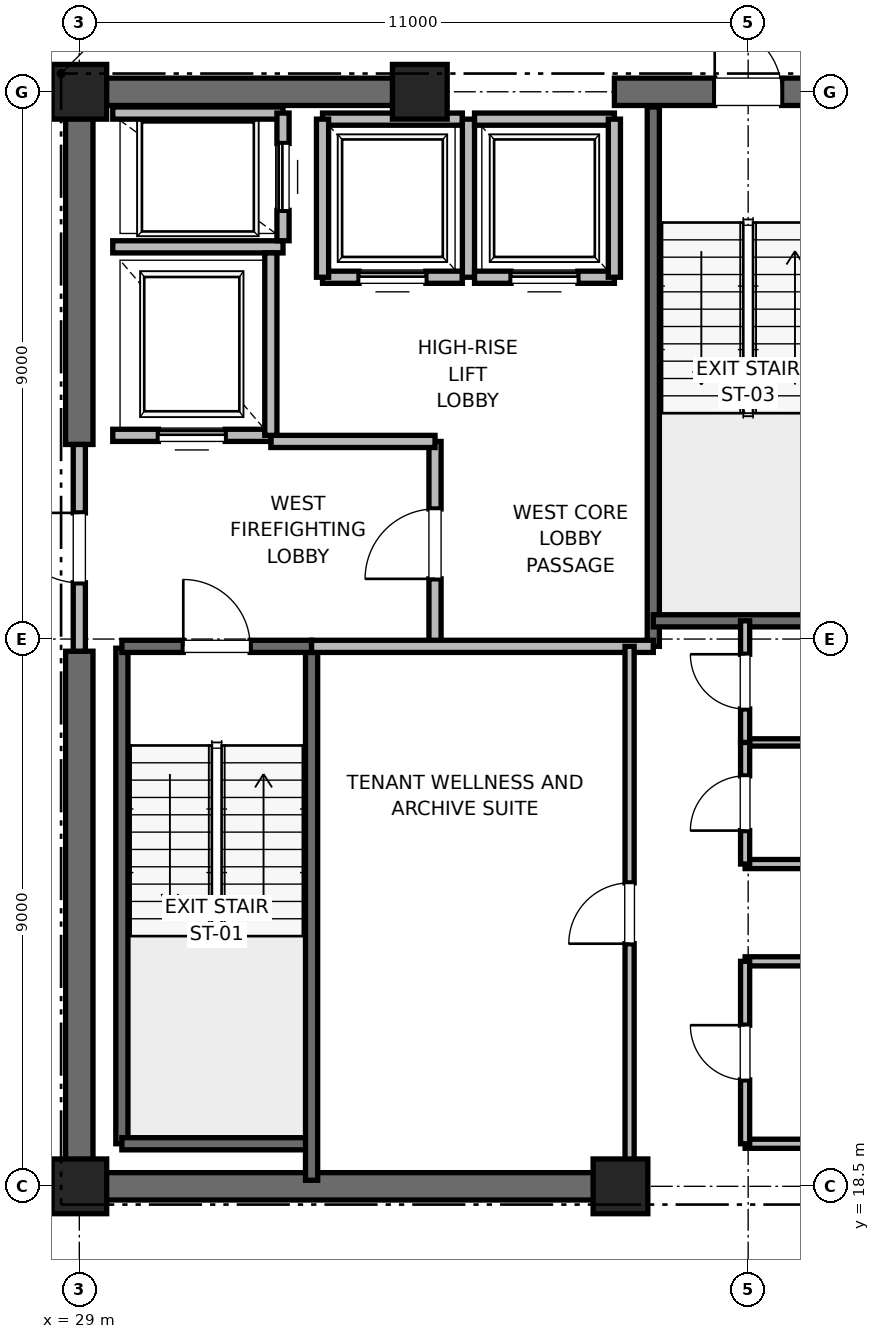
"""IFC4 building model, lengths in metres.
Left out: names, types, materials, properties, quantities, classifications, styles, units other than length and angle.
Written with IfcOpenShell. Run it as: python <this file> out.ifc"""

import sys

from ifc_helpers import new_model, si_unit, direction, frame, frame_2d, origin, origin_2d, place, context, subcontext, project, spatial, rectangle, extrude, element, fill, save


model = new_model("IFC4")
c1 = context("Model", 3, precision=1e-05, world=origin(), true_north=direction((0.0, 1.0)))
c2 = subcontext(c1, "Body", "Model", "MODEL_VIEW")
j1 = project(units=[si_unit("LENGTHUNIT", "METRE"), si_unit("PLANEANGLEUNIT", "RADIAN")], contexts=[c1])
p1 = place(None, origin())
s1 = spatial("IfcSite", under=j1, at=p1, CompositionType="ELEMENT")
p2 = place(p1, origin())
s2 = spatial("IfcBuilding", under=s1, at=p2, CompositionType="ELEMENT")
p3 = place(p2, frame((0.0, 0.0, 287.2)))
s3 = spatial("IfcBuildingStorey", under=s2, at=p3, CompositionType="ELEMENT", Elevation=287.2)
for number, where, z_axis, x_axis in (
    (1, (29.0, 18.5, 0.0), (0.0, 0.0, 1.0), (1.0, 0.0, 0.0)),
    (2, (29.0, 36.5, 0.0), (0.0, 0.0, 1.0), (1.0, 0.0, 0.0)),
    (3, (37.9, 18.5, 0.0), (0.0, 0.0, 1.0), (1.0, 0.0, 0.0)),
    (4, (34.6, 36.5, 0.0), (0.0, 0.0, 1.0), (1.0, 0.0, 0.0)),
):
    element("IfcColumn", number, at=place(p3, frame(where, z_axis=z_axis, x_axis=x_axis)), inside=s3, PredefinedType="PILASTER", context=c2, shape_type="SweptSolid", body=[
        extrude(rectangle(XDim=0.9, YDim=0.9, at=origin_2d()), origin(), (0.0, 0.0, 1.0), 4.0),
    ])
p4 = place(p3, frame((29.0, 18.5, 0.0), z_axis=(0.0, 0.0, 1.0), x_axis=(1.0, 0.0, 0.0)))
e5 = element("IfcWall", 5, at=p4, inside=s3, PredefinedType="SHEAR", context=c2, shape_type="SweptSolid", body=[
    extrude(rectangle(XDim=9.2, YDim=0.45, at=frame_2d((4.6, 0.0))), origin(), (0.0, 0.0, 1.0), 3.785),
])
p5 = place(p3, frame((29.0, 36.5, 0.0), z_axis=(0.0, 0.0, 1.0), x_axis=(1.0, 0.0, 0.0)))
e6 = element("IfcWall", 6, at=p5, inside=s3, PredefinedType="SHEAR", context=c2, shape_type="SweptSolid", body=[
    extrude(rectangle(XDim=5.8, YDim=0.45, at=frame_2d((2.9, 0.0))), origin(), (0.0, 0.0, 1.0), 3.785),
])
p6 = place(p3, frame((37.8, 36.5, 0.0), z_axis=(0.0, 0.0, 1.0), x_axis=(1.0, 0.0, 0.0)))
e7 = element("IfcWall", 7, at=p6, inside=s3, PredefinedType="SHEAR", context=c2, shape_type="SweptSolid", body=[
    extrude(rectangle(XDim=4.4, YDim=0.45, at=frame_2d((2.2, 0.0))), origin(), (0.0, 0.0, 1.0), 3.785),
])
p7 = place(p6, frame((1.65, 0.0, 0.0)))
e8 = element("IfcOpeningElement", 8, at=p7, cuts=e7, PredefinedType="OPENING", context=c2, shape_type="SweptSolid", body=[
    extrude(rectangle(XDim=1.1, YDim=2.15, at=frame_2d((0.55, 1.075))), frame((0.0, 0.225, 0.0), z_axis=(0.0, -1.0, 0.0), x_axis=(1.0, 0.0, 0.0)), (0.0, 0.0, 1.0), 0.45),
])
p8 = place(p3, frame((29.0, 18.5, 0.0), z_axis=(0.0, 0.0, 1.0), x_axis=(0.0, 1.0, 0.0)))
e9 = element("IfcWall", 9, at=p8, inside=s3, PredefinedType="SHEAR", context=c2, shape_type="SweptSolid", body=[
    extrude(rectangle(XDim=8.8, YDim=0.45, at=frame_2d((4.4, 0.0))), origin(), (0.0, 0.0, 1.0), 3.785),
])
p9 = place(p3, frame((29.0, 30.7, 0.0), z_axis=(0.0, 0.0, 1.0), x_axis=(0.0, 1.0, 0.0)))
e10 = element("IfcWall", 10, at=p9, inside=s3, PredefinedType="SHEAR", context=c2, shape_type="SweptSolid", body=[
    extrude(rectangle(XDim=5.8, YDim=0.45, at=frame_2d((2.9, 0.0))), origin(), (0.0, 0.0, 1.0), 3.785),
])
p10 = place(p3, frame((29.7, 19.2, 0.0), z_axis=(0.0, 0.0, 1.0), x_axis=(0.0, 1.0, 0.0)))
e11 = element("IfcWall", 11, at=p10, inside=s3, PredefinedType="SOLIDWALL", context=c2, shape_type="SweptSolid", body=[
    extrude(rectangle(XDim=8.15, YDim=0.2, at=frame_2d((4.075, 0.0))), origin(), (0.0, 0.0, 1.0), 3.785),
])
p11 = place(p3, frame((29.7, 19.2, 0.0), z_axis=(0.0, 0.0, 1.0), x_axis=(1.0, 0.0, 0.0)))
e12 = element("IfcWall", 12, at=p11, inside=s3, PredefinedType="SOLIDWALL", context=c2, shape_type="SweptSolid", body=[
    extrude(rectangle(XDim=3.12, YDim=0.2, at=frame_2d((1.56, 0.0))), origin(), (0.0, 0.0, 1.0), 3.785),
])
p12 = place(p3, frame((32.82, 18.6, 0.0), z_axis=(0.0, 0.0, 1.0), x_axis=(0.0, 1.0, 0.0)))
e13 = element("IfcWall", 13, at=p12, inside=s3, PredefinedType="SOLIDWALL", context=c2, shape_type="SweptSolid", body=[
    extrude(rectangle(XDim=8.78, YDim=0.2, at=frame_2d((4.39, 0.0))), origin(), (0.0, 0.0, 1.0), 3.785),
])
p13 = place(p3, frame((29.7, 27.38, 0.0), z_axis=(0.0, 0.0, 1.0), x_axis=(1.0, 0.0, 0.0)))
e14 = element("IfcWall", 14, at=p13, inside=s3, PredefinedType="SOLIDWALL", context=c2, shape_type="SweptSolid", body=[
    extrude(rectangle(XDim=3.12, YDim=0.2, at=frame_2d((1.56, 0.0))), origin(), (0.0, 0.0, 1.0), 3.785),
])
p14 = place(p13, frame((1.01, 0.0, 0.0)))
e15 = element("IfcOpeningElement", 15, at=p14, cuts=e14, PredefinedType="OPENING", context=c2, shape_type="SweptSolid", body=[
    extrude(rectangle(XDim=1.1, YDim=2.15, at=frame_2d((0.55, 1.075))), frame((0.0, 0.1, 0.0), z_axis=(0.0, -1.0, 0.0), x_axis=(1.0, 0.0, 0.0)), (0.0, 0.0, 1.0), 0.2),
])
p15 = place(p3, frame((38.44, 27.38, 0.0), z_axis=(0.0, 0.0, 1.0), x_axis=(0.0, 1.0, 0.0)))
e16 = element("IfcWall", 16, at=p15, inside=s3, PredefinedType="SOLIDWALL", context=c2, shape_type="SweptSolid", body=[
    extrude(rectangle(XDim=8.87, YDim=0.2, at=frame_2d((4.435, 0.0))), origin(), (0.0, 0.0, 1.0), 3.785),
])
p16 = place(p3, frame((38.44, 27.8, 0.0), z_axis=(0.0, 0.0, 1.0), x_axis=(1.0, 0.0, 0.0)))
e17 = element("IfcWall", 17, at=p16, inside=s3, PredefinedType="SOLIDWALL", context=c2, shape_type="SweptSolid", body=[
    extrude(rectangle(XDim=3.32, YDim=0.2, at=frame_2d((1.66, 0.0))), origin(), (0.0, 0.0, 1.0), 3.785),
])
p17 = place(p3, frame((34.85, 27.38, 0.0), z_axis=(0.0, 0.0, 1.0), x_axis=(0.0, 1.0, 0.0)))
e18 = element("IfcWall", 18, at=p17, inside=s3, PredefinedType="PARTITIONING", context=c2, shape_type="SweptSolid", body=[
    extrude(rectangle(XDim=3.37, YDim=0.2, at=frame_2d((1.685, 0.0))), origin(), (0.0, 0.0, 1.0), 3.785),
])
p18 = place(p17, frame((1.11, 0.0, 0.0)))
e19 = element("IfcOpeningElement", 19, at=p18, cuts=e18, PredefinedType="OPENING", context=c2, shape_type="SweptSolid", body=[
    extrude(rectangle(XDim=1.15, YDim=2.2, at=frame_2d((0.575, 1.1))), frame((0.0, 0.1, 0.0), z_axis=(0.0, -1.0, 0.0), x_axis=(1.0, 0.0, 0.0)), (0.0, 0.0, 1.0), 0.2),
])
p19 = place(p3, frame((29.0, 27.3, 0.0), z_axis=(0.0, 0.0, 1.0), x_axis=(0.0, 1.0, 0.0)))
e20 = element("IfcWall", 20, at=p19, inside=s3, PredefinedType="PARTITIONING", context=c2, shape_type="SweptSolid", body=[
    extrude(rectangle(XDim=3.4, YDim=0.2, at=frame_2d((1.7, 0.0))), origin(), (0.0, 0.0, 1.0), 2.865),
])
p20 = place(p19, frame((1.125, 0.0, 0.0)))
e21 = element("IfcOpeningElement", 21, at=p20, cuts=e20, PredefinedType="OPENING", context=c2, shape_type="SweptSolid", body=[
    extrude(rectangle(XDim=1.15, YDim=2.2, at=frame_2d((0.575, 1.1))), frame((0.0, 0.1, 0.0), z_axis=(0.0, -1.0, 0.0), x_axis=(1.0, 0.0, 0.0)), (0.0, 0.0, 1.0), 0.2),
])
p21 = place(p3, frame((32.82, 27.38, 0.0), z_axis=(0.0, 0.0, 1.0), x_axis=(1.0, 0.0, 0.0)))
e22 = element("IfcWall", 22, at=p21, inside=s3, PredefinedType="PARTITIONING", context=c2, shape_type="SweptSolid", body=[
    extrude(rectangle(XDim=5.62, YDim=0.2, at=frame_2d((2.81, 0.0))), origin(), (0.0, 0.0, 1.0), 3.785),
])
p22 = place(p3, frame((32.15, 30.75, 0.0), z_axis=(0.0, 0.0, 1.0), x_axis=(1.0, 0.0, 0.0)))
e23 = element("IfcWall", 23, at=p22, inside=s3, PredefinedType="PARTITIONING", context=c2, shape_type="SweptSolid", body=[
    extrude(rectangle(XDim=2.7, YDim=0.2, at=frame_2d((1.35, 0.0))), origin(), (0.0, 0.0, 1.0), 3.785),
])
p23 = place(p3, frame((29.55, 30.85, 0.0), z_axis=(0.0, 0.0, 1.0), x_axis=(1.0, 0.0, 0.0)))
e24 = element("IfcWall", 24, at=p23, inside=s3, PredefinedType="SOLIDWALL", context=c2, shape_type="SweptSolid", body=[
    extrude(rectangle(XDim=2.6, YDim=0.2, at=frame_2d((1.3, 0.0))), origin(), (0.0, 0.0, 1.0), 2.865),
])
p24 = place(p23, frame((0.75, 0.0, 0.0)))
e25 = element("IfcOpeningElement", 25, at=p24, cuts=e24, PredefinedType="OPENING", context=c2, shape_type="SweptSolid", body=[
    extrude(rectangle(XDim=1.1, YDim=2.2, at=frame_2d((0.55, 1.1))), frame((0.0, 0.1, 0.0), z_axis=(0.0, -1.0, 0.0), x_axis=(1.0, 0.0, 0.0)), (0.0, 0.0, 1.0), 0.2),
])
p25 = place(p3, frame((29.55, 33.95, 0.0), z_axis=(0.0, 0.0, 1.0), x_axis=(1.0, 0.0, 0.0)))
e26 = element("IfcWall", 26, at=p25, inside=s3, PredefinedType="SOLIDWALL", context=c2, shape_type="SweptSolid", body=[
    extrude(rectangle(XDim=2.8, YDim=0.2, at=frame_2d((1.4, 0.0))), origin(), (0.0, 0.0, 1.0), 3.785),
])
p26 = place(p3, frame((32.15, 30.85, 0.0), z_axis=(0.0, 0.0, 1.0), x_axis=(0.0, 1.0, 0.0)))
e27 = element("IfcWall", 27, at=p26, inside=s3, PredefinedType="SOLIDWALL", context=c2, shape_type="SweptSolid", body=[
    extrude(rectangle(XDim=3.0, YDim=0.2, at=frame_2d((1.5, 0.0))), origin(), (0.0, 0.0, 1.0), 3.785),
])
p27 = place(p3, frame((32.35, 36.15, 0.0), z_axis=(0.0, 0.0, 1.0), x_axis=(-1.0, 0.0, 0.0)))
e28 = element("IfcWall", 28, at=p27, inside=s3, PredefinedType="SOLIDWALL", context=c2, shape_type="SweptSolid", body=[
    extrude(rectangle(XDim=2.8, YDim=0.2, at=frame_2d((1.4, 0.0))), origin(), (0.0, 0.0, 1.0), 3.148),
])
p28 = place(p3, frame((32.35, 34.05, 0.0), z_axis=(0.0, 0.0, 1.0), x_axis=(0.0, 1.0, 0.0)))
e29 = element("IfcWall", 29, at=p28, inside=s3, PredefinedType="SOLIDWALL", context=c2, shape_type="SweptSolid", body=[
    extrude(rectangle(XDim=2.1, YDim=0.2, at=frame_2d((1.05, 0.0))), origin(), (0.0, 0.0, 1.0), 3.785),
])
p29 = place(p28, frame((0.5, 0.0, 0.0)))
e30 = element("IfcOpeningElement", 30, at=p29, cuts=e29, PredefinedType="OPENING", context=c2, shape_type="SweptSolid", body=[
    extrude(rectangle(XDim=1.1, YDim=2.2, at=frame_2d((0.55, 1.1))), frame((0.0, 0.1, 0.0), z_axis=(0.0, -1.0, 0.0), x_axis=(1.0, 0.0, 0.0)), (0.0, 0.0, 1.0), 0.2),
])
p30 = place(p3, frame((33.0, 33.45, 0.0), z_axis=(0.0, 0.0, 1.0), x_axis=(1.0, 0.0, 0.0)))
e31 = element("IfcWall", 31, at=p30, inside=s3, PredefinedType="SOLIDWALL", context=c2, shape_type="SweptSolid", body=[
    extrude(rectangle(XDim=2.3, YDim=0.2, at=frame_2d((1.15, 0.0))), origin(), (0.0, 0.0, 1.0), 3.785),
])
p31 = place(p30, frame((0.6, 0.0, 0.0)))
e32 = element("IfcOpeningElement", 32, at=p31, cuts=e31, PredefinedType="OPENING", context=c2, shape_type="SweptSolid", body=[
    extrude(rectangle(XDim=1.1, YDim=2.2, at=frame_2d((0.55, 1.1))), frame((0.0, 0.1, 0.0), z_axis=(0.0, -1.0, 0.0), x_axis=(1.0, 0.0, 0.0)), (0.0, 0.0, 1.0), 0.2),
])
p32 = place(p3, frame((35.3, 36.05, 0.0), z_axis=(0.0, 0.0, 1.0), x_axis=(-1.0, 0.0, 0.0)))
e33 = element("IfcWall", 33, at=p32, inside=s3, PredefinedType="SOLIDWALL", context=c2, shape_type="SweptSolid", body=[
    extrude(rectangle(XDim=2.3, YDim=0.2, at=frame_2d((1.15, 0.0))), origin(), (0.0, 0.0, 1.0), 2.865),
])
p33 = place(p3, frame((33.0, 36.05, 0.0), z_axis=(0.0, 0.0, 1.0), x_axis=(0.0, -1.0, 0.0)))
e34 = element("IfcWall", 34, at=p33, inside=s3, PredefinedType="SOLIDWALL", context=c2, shape_type="SweptSolid", body=[
    extrude(rectangle(XDim=2.6, YDim=0.2, at=frame_2d((1.3, 0.0))), origin(), (0.0, 0.0, 1.0), 3.785),
])
p34 = place(p3, frame((35.4, 33.45, 0.0), z_axis=(0.0, 0.0, 1.0), x_axis=(0.0, 1.0, 0.0)))
e35 = element("IfcWall", 35, at=p34, inside=s3, PredefinedType="SOLIDWALL", context=c2, shape_type="SweptSolid", body=[
    extrude(rectangle(XDim=2.6, YDim=0.2, at=frame_2d((1.3, 0.0))), origin(), (0.0, 0.0, 1.0), 2.865),
])
p35 = place(p3, frame((35.5, 33.45, 0.0), z_axis=(0.0, 0.0, 1.0), x_axis=(1.0, 0.0, 0.0)))
e36 = element("IfcWall", 36, at=p35, inside=s3, PredefinedType="SOLIDWALL", context=c2, shape_type="SweptSolid", body=[
    extrude(rectangle(XDim=2.3, YDim=0.2, at=frame_2d((1.15, 0.0))), origin(), (0.0, 0.0, 1.0), 3.785),
])
p36 = place(p35, frame((0.6, 0.0, 0.0)))
e37 = element("IfcOpeningElement", 37, at=p36, cuts=e36, PredefinedType="OPENING", context=c2, shape_type="SweptSolid", body=[
    extrude(rectangle(XDim=1.1, YDim=2.2, at=frame_2d((0.55, 1.1))), frame((0.0, 0.1, 0.0), z_axis=(0.0, -1.0, 0.0), x_axis=(1.0, 0.0, 0.0)), (0.0, 0.0, 1.0), 0.2),
])
p37 = place(p3, frame((37.8, 36.05, 0.0), z_axis=(0.0, 0.0, 1.0), x_axis=(-1.0, 0.0, 0.0)))
e38 = element("IfcWall", 38, at=p37, inside=s3, PredefinedType="SOLIDWALL", context=c2, shape_type="SweptSolid", body=[
    extrude(rectangle(XDim=2.3, YDim=0.2, at=frame_2d((1.15, 0.0))), origin(), (0.0, 0.0, 1.0), 2.865),
])
p38 = place(p3, frame((37.8, 33.45, 0.0), z_axis=(0.0, 0.0, 1.0), x_axis=(0.0, 1.0, 0.0)))
e39 = element("IfcWall", 39, at=p38, inside=s3, PredefinedType="SOLIDWALL", context=c2, shape_type="SweptSolid", body=[
    extrude(rectangle(XDim=2.6, YDim=0.2, at=frame_2d((1.3, 0.0))), origin(), (0.0, 0.0, 1.0), 2.865),
])
for number, where, z_axis, x_axis in (
    (40, (39.95, 19.2, 0.0), (0.0, 0.0, 1.0), (1.0, 0.0, 0.0)),
    (41, (39.95, 22.2, 0.0), (0.0, 0.0, 1.0), (1.0, 0.0, 0.0)),
    (42, (39.95, 23.8, 0.0), (0.0, 0.0, 1.0), (1.0, 0.0, 0.0)),
):
    element("IfcWall", number, at=place(p3, frame(where, z_axis=z_axis, x_axis=x_axis)), inside=s3, PredefinedType="PARTITIONING", context=c2, shape_type="SweptSolid", body=[
        extrude(rectangle(XDim=1.81, YDim=0.15, at=frame_2d((0.905, 0.0))), origin(), (0.0, 0.0, 1.0), 2.85),
    ])
p39 = place(p3, frame((39.95, 25.8, 0.0), z_axis=(0.0, 0.0, 1.0), x_axis=(1.0, 0.0, 0.0)))
e43 = element("IfcWall", 43, at=p39, inside=s3, PredefinedType="PARTITIONING", context=c2, shape_type="SweptSolid", body=[
    extrude(rectangle(XDim=1.81, YDim=0.12, at=frame_2d((0.905, 0.0))), origin(), (0.0, 0.0, 1.0), 2.85),
])
p40 = place(p3, frame((39.95, 19.2, 0.0), z_axis=(0.0, 0.0, 1.0), x_axis=(0.0, 1.0, 0.0)))
e44 = element("IfcWall", 44, at=p40, inside=s3, PredefinedType="PARTITIONING", context=c2, shape_type="SweptSolid", body=[
    extrude(rectangle(XDim=3.0, YDim=0.15, at=frame_2d((1.5, 0.0))), origin(), (0.0, 0.0, 1.0), 2.85),
])
p41 = place(p40, frame((1.05, 0.0, 0.0)))
e45 = element("IfcOpeningElement", 45, at=p41, cuts=e44, PredefinedType="OPENING", context=c2, shape_type="SweptSolid", body=[
    extrude(rectangle(XDim=0.9, YDim=2.1, at=frame_2d((0.45, 1.05))), frame((0.0, 0.075, 0.0), z_axis=(0.0, -1.0, 0.0), x_axis=(1.0, 0.0, 0.0)), (0.0, 0.0, 1.0), 0.15),
])
p42 = place(p3, frame((39.95, 23.8, 0.0), z_axis=(0.0, 0.0, 1.0), x_axis=(0.0, 1.0, 0.0)))
e46 = element("IfcWall", 46, at=p42, inside=s3, PredefinedType="PARTITIONING", context=c2, shape_type="SweptSolid", body=[
    extrude(rectangle(XDim=2.0, YDim=0.15, at=frame_2d((1.0, 0.0))), origin(), (0.0, 0.0, 1.0), 2.85),
])
p43 = place(p42, frame((0.55, 0.0, 0.0)))
e47 = element("IfcOpeningElement", 47, at=p43, cuts=e46, PredefinedType="OPENING", context=c2, shape_type="SweptSolid", body=[
    extrude(rectangle(XDim=0.9, YDim=2.1, at=frame_2d((0.45, 1.05))), frame((0.0, 0.075, 0.0), z_axis=(0.0, -1.0, 0.0), x_axis=(1.0, 0.0, 0.0)), (0.0, 0.0, 1.0), 0.15),
])
p44 = place(p3, frame((39.95, 25.8, 0.0), z_axis=(0.0, 0.0, 1.0), x_axis=(0.0, 1.0, 0.0)))
e48 = element("IfcWall", 48, at=p44, inside=s3, PredefinedType="PARTITIONING", context=c2, shape_type="SweptSolid", body=[
    extrude(rectangle(XDim=2.0, YDim=0.15, at=frame_2d((1.0, 0.0))), origin(), (0.0, 0.0, 1.0), 2.85),
])
p45 = place(p44, frame((0.55, 0.0, 0.0)))
e49 = element("IfcOpeningElement", 49, at=p45, cuts=e48, PredefinedType="OPENING", context=c2, shape_type="SweptSolid", body=[
    extrude(rectangle(XDim=0.9, YDim=2.1, at=frame_2d((0.45, 1.05))), frame((0.0, 0.075, 0.0), z_axis=(0.0, -1.0, 0.0), x_axis=(1.0, 0.0, 0.0)), (0.0, 0.0, 1.0), 0.15),
])
p46 = place(p3, frame((38.05, 18.6, 0.0), z_axis=(0.0, 0.0, 1.0), x_axis=(0.0, 1.0, 0.0)))
e50 = element("IfcWall", 50, at=p46, inside=s3, PredefinedType="PARTITIONING", context=c2, shape_type="SweptSolid", body=[
    extrude(rectangle(XDim=8.78, YDim=0.15, at=frame_2d((4.39, 0.0))), origin(), (0.0, 0.0, 1.0), 2.85),
])
p47 = place(p46, frame((3.89, 0.0, 0.0)))
e51 = element("IfcOpeningElement", 51, at=p47, cuts=e50, PredefinedType="OPENING", context=c2, shape_type="SweptSolid", body=[
    extrude(rectangle(XDim=1.0, YDim=2.15, at=frame_2d((0.5, 1.075))), frame((0.0, 0.075, 0.0), z_axis=(0.0, -1.0, 0.0), x_axis=(1.0, 0.0, 0.0)), (0.0, 0.0, 1.0), 0.15),
])
p48 = place(p14, origin())
e52 = element("IfcDoor", 52, at=p48, inside=s3, OperationType="SINGLE_SWING_LEFT", PredefinedType="DOOR", context=c2, shape_type="SweptSolid", body=[
    extrude(rectangle(XDim=1.1, YDim=2.15, at=frame_2d((0.55, 1.075))), frame((0.0, 0.025, 0.0), z_axis=(0.0, -1.0, 0.0), x_axis=(1.0, 0.0, 0.0)), (0.0, 0.0, 1.0), 0.05),
])
fill(e15, e52)
p49 = place(p7, origin())
e53 = element("IfcDoor", 53, at=p49, inside=s3, OperationType="SINGLE_SWING_LEFT", PredefinedType="DOOR", context=c2, shape_type="SweptSolid", body=[
    extrude(rectangle(XDim=1.1, YDim=2.15, at=frame_2d((0.55, 1.075))), frame((0.0, 0.025, 0.0), z_axis=(0.0, -1.0, 0.0), x_axis=(1.0, 0.0, 0.0)), (0.0, 0.0, 1.0), 0.05),
])
fill(e8, e53)
p50 = place(p18, origin())
e54 = element("IfcDoor", 54, at=p50, inside=s3, OperationType="SINGLE_SWING_LEFT", PredefinedType="DOOR", context=c2, shape_type="SweptSolid", body=[
    extrude(rectangle(XDim=1.15, YDim=2.2, at=frame_2d((0.575, 1.1))), frame((0.0, 0.025, 0.0), z_axis=(0.0, -1.0, 0.0), x_axis=(1.0, 0.0, 0.0)), (0.0, 0.0, 1.0), 0.05),
])
fill(e19, e54)
p51 = place(p20, origin())
e55 = element("IfcDoor", 55, at=p51, inside=s3, OperationType="SINGLE_SWING_RIGHT", PredefinedType="DOOR", context=c2, shape_type="SweptSolid", body=[
    extrude(rectangle(XDim=1.15, YDim=2.2, at=frame_2d((0.575, 1.1))), frame((0.0, 0.025, 0.0), z_axis=(0.0, -1.0, 0.0), x_axis=(1.0, 0.0, 0.0)), (0.0, 0.0, 1.0), 0.05),
])
fill(e21, e55)
p52 = place(p24, origin())
e56 = element("IfcDoor", 56, at=p52, inside=s3, OperationType="SLIDING_TO_RIGHT", PredefinedType="DOOR", context=c2, shape_type="SweptSolid", body=[
    extrude(rectangle(XDim=1.1, YDim=2.2, at=frame_2d((0.55, 1.1))), frame((0.0, 0.025, 0.0), z_axis=(0.0, -1.0, 0.0), x_axis=(1.0, 0.0, 0.0)), (0.0, 0.0, 1.0), 0.05),
])
fill(e25, e56)
p53 = place(p29, origin())
e57 = element("IfcDoor", 57, at=p53, inside=s3, OperationType="SLIDING_TO_RIGHT", PredefinedType="DOOR", context=c2, shape_type="SweptSolid", body=[
    extrude(rectangle(XDim=1.1, YDim=2.2, at=frame_2d((0.55, 1.1))), frame((0.0, 0.025, 0.0), z_axis=(0.0, -1.0, 0.0), x_axis=(1.0, 0.0, 0.0)), (0.0, 0.0, 1.0), 0.05),
])
fill(e30, e57)
p54 = place(p31, origin())
e58 = element("IfcDoor", 58, at=p54, inside=s3, OperationType="SLIDING_TO_RIGHT", PredefinedType="DOOR", context=c2, shape_type="SweptSolid", body=[
    extrude(rectangle(XDim=1.1, YDim=2.2, at=frame_2d((0.55, 1.1))), frame((0.0, 0.025, 0.0), z_axis=(0.0, -1.0, 0.0), x_axis=(1.0, 0.0, 0.0)), (0.0, 0.0, 1.0), 0.05),
])
fill(e32, e58)
p55 = place(p36, origin())
e59 = element("IfcDoor", 59, at=p55, inside=s3, OperationType="SLIDING_TO_RIGHT", PredefinedType="DOOR", context=c2, shape_type="SweptSolid", body=[
    extrude(rectangle(XDim=1.1, YDim=2.2, at=frame_2d((0.55, 1.1))), frame((0.0, 0.025, 0.0), z_axis=(0.0, -1.0, 0.0), x_axis=(1.0, 0.0, 0.0)), (0.0, 0.0, 1.0), 0.05),
])
fill(e37, e59)
p56 = place(p41, origin())
e60 = element("IfcDoor", 60, at=p56, inside=s3, OperationType="SINGLE_SWING_RIGHT", PredefinedType="DOOR", context=c2, shape_type="SweptSolid", body=[
    extrude(rectangle(XDim=0.9, YDim=2.1, at=frame_2d((0.45, 1.05))), frame((0.0, 0.025, 0.0), z_axis=(0.0, -1.0, 0.0), x_axis=(1.0, 0.0, 0.0)), (0.0, 0.0, 1.0), 0.05),
])
fill(e45, e60)
p57 = place(p43, origin())
e61 = element("IfcDoor", 61, at=p57, inside=s3, OperationType="SINGLE_SWING_LEFT", PredefinedType="DOOR", context=c2, shape_type="SweptSolid", body=[
    extrude(rectangle(XDim=0.9, YDim=2.1, at=frame_2d((0.45, 1.05))), frame((0.0, 0.025, 0.0), z_axis=(0.0, -1.0, 0.0), x_axis=(1.0, 0.0, 0.0)), (0.0, 0.0, 1.0), 0.05),
])
fill(e47, e61)
p58 = place(p45, origin())
e62 = element("IfcDoor", 62, at=p58, inside=s3, OperationType="SINGLE_SWING_RIGHT", PredefinedType="DOOR", context=c2, shape_type="SweptSolid", body=[
    extrude(rectangle(XDim=0.9, YDim=2.1, at=frame_2d((0.45, 1.05))), frame((0.0, 0.025, 0.0), z_axis=(0.0, -1.0, 0.0), x_axis=(1.0, 0.0, 0.0)), (0.0, 0.0, 1.0), 0.05),
])
fill(e49, e62)
p59 = place(p47, origin())
e63 = element("IfcDoor", 63, at=p59, inside=s3, OperationType="SINGLE_SWING_LEFT", PredefinedType="DOOR", context=c2, shape_type="SweptSolid", body=[
    extrude(rectangle(XDim=1.0, YDim=2.15, at=frame_2d((0.5, 1.075))), frame((0.0, 0.025, 0.0), z_axis=(0.0, -1.0, 0.0), x_axis=(1.0, 0.0, 0.0)), (0.0, 0.0, 1.0), 0.05),
])
fill(e51, e63)
save(model, sys.argv[1])
